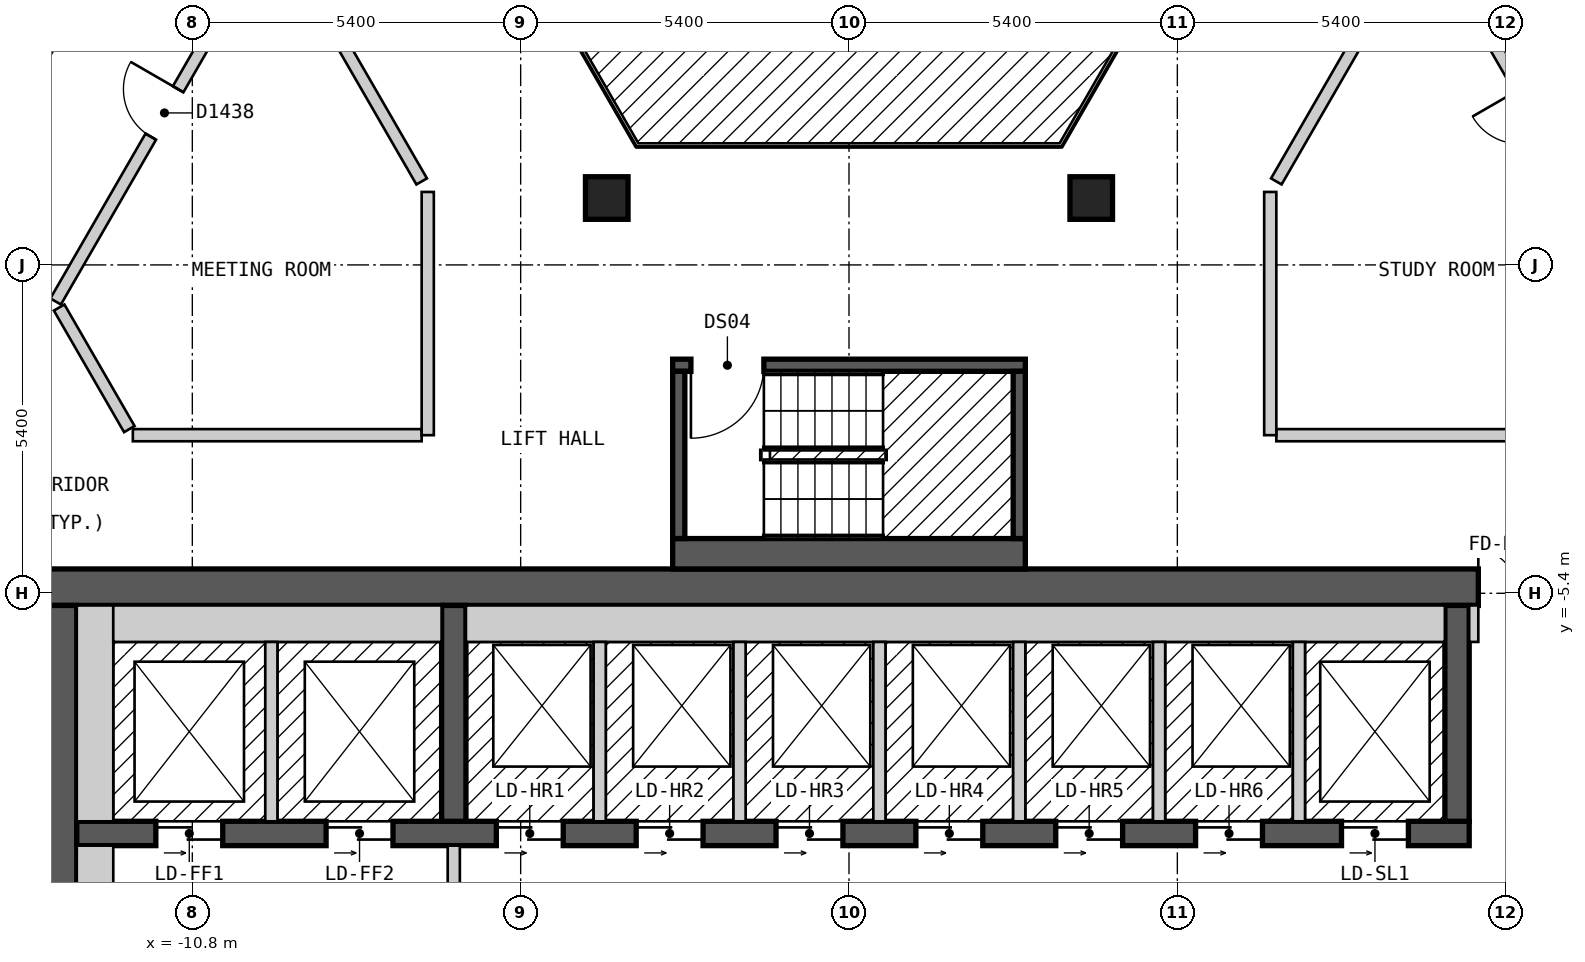
"""IFC4 building model, lengths in metres.
Left out: names, types, materials, properties, quantities, classifications, styles, units other than length and angle.
Written with IfcOpenShell. Run it as: python <this file> out.ifc"""

import sys

from ifc_helpers import new_model, si_unit, direction, frame, frame_2d, origin, origin_2d, place, context, subcontext, project, spatial, rectangle, extrude, element, fill, save


model = new_model("IFC4")
c1 = context("Model", 3, precision=1e-05, world=origin(), true_north=direction((0.0, 1.0)))
c2 = subcontext(c1, "Body", "Model", "MODEL_VIEW")
j1 = project(units=[si_unit("LENGTHUNIT", "METRE"), si_unit("PLANEANGLEUNIT", "RADIAN")], contexts=[c1])
p1 = place(None, origin())
s1 = spatial("IfcSite", under=j1, at=p1, CompositionType="ELEMENT")
p2 = place(p1, origin())
s2 = spatial("IfcBuilding", under=s1, at=p2, CompositionType="ELEMENT")
p3 = place(p2, frame((0.0, 0.0, 172.2)))
s3 = spatial("IfcBuildingStorey", under=s2, at=p3, CompositionType="ELEMENT", Elevation=172.2)
for number, where, z_axis, x_axis in (
    (1, (3.984, 1.1, 0.0), (0.0, 0.0, 1.0), (1.0, 0.0, 0.0)),
    (2, (-3.984, 1.1, 0.0), (0.0, 0.0, 1.0), (1.0, 0.0, 0.0)),
):
    element("IfcColumn", number, at=place(p3, frame(where, z_axis=z_axis, x_axis=x_axis)), inside=s3, PredefinedType="COLUMN", context=c2, shape_type="SweptSolid", body=[
        extrude(rectangle(XDim=0.7, YDim=0.7, at=origin_2d()), origin(), (0.0, 0.0, 1.0), 3.0),
    ])
p4 = place(p3, frame((-13.3, -5.3, 0.0), z_axis=(0.0, 0.0, 1.0), x_axis=(1.0, 0.0, 0.0)))
e3 = element("IfcWall", 3, at=p4, inside=s3, PredefinedType="SHEAR", context=c2, shape_type="SweptSolid", body=[
    extrude(rectangle(XDim=26.6, YDim=0.6, at=frame_2d((13.3, 0.0))), origin(), (0.0, 0.0, 1.0), 2.7),
])
p5 = place(p4, frame((23.65, 0.0, 0.0)))
e4 = element("IfcOpeningElement", 4, at=p5, cuts=e3, PredefinedType="OPENING", context=c2, shape_type="SweptSolid", body=[
    extrude(rectangle(XDim=1.2, YDim=2.1, at=frame_2d((0.6, 1.05))), frame((0.0, 0.31, 0.0), z_axis=(0.0, -1.0, 0.0), x_axis=(1.0, 0.0, 0.0)), (0.0, 0.0, 1.0), 0.62),
])
p6 = place(p3, frame((-13.0, -18.4, 0.0), z_axis=(0.0, 0.0, 1.0), x_axis=(0.0, 1.0, 0.0)))
e5 = element("IfcWall", 5, at=p6, inside=s3, PredefinedType="SHEAR", context=c2, shape_type="SweptSolid", body=[
    extrude(rectangle(XDim=12.8, YDim=0.6, at=frame_2d((6.4, 0.0))), origin(), (0.0, 0.0, 1.0), 2.7),
])
p7 = place(p6, frame((4.2, 0.0, 0.0)))
e6 = element("IfcOpeningElement", 6, at=p7, cuts=e5, PredefinedType="OPENING", context=c2, shape_type="SweptSolid", body=[
    extrude(rectangle(XDim=1.2, YDim=2.1, at=frame_2d((0.6, 1.05))), frame((0.0, 0.31, 0.0), z_axis=(0.0, -1.0, 0.0), x_axis=(1.0, 0.0, 0.0)), (0.0, 0.0, 1.0), 0.62),
])
p8 = place(p3, frame((-12.7, -9.35, 0.0), z_axis=(0.0, 0.0, 1.0), x_axis=(1.0, 0.0, 0.0)))
e7 = element("IfcWall", 7, at=p8, inside=s3, PredefinedType="SHEAR", context=c2, shape_type="SweptSolid", body=[
    extrude(rectangle(XDim=22.9, YDim=0.4, at=frame_2d((11.45, 0.0))), origin(), (0.0, 0.0, 1.0), 2.7),
])
p9 = place(p8, frame((1.3, 0.0, 0.0)))
e8 = element("IfcOpeningElement", 8, at=p9, cuts=e7, PredefinedType="OPENING", context=c2, shape_type="SweptSolid", body=[
    extrude(rectangle(XDim=1.1, YDim=2.1, at=frame_2d((0.55, 1.05))), frame((0.0, 0.21, 0.0), z_axis=(0.0, -1.0, 0.0), x_axis=(1.0, 0.0, 0.0)), (0.0, 0.0, 1.0), 0.42),
])
p10 = place(p8, frame((4.1, 0.0, 0.0)))
e9 = element("IfcOpeningElement", 9, at=p10, cuts=e7, PredefinedType="OPENING", context=c2, shape_type="SweptSolid", body=[
    extrude(rectangle(XDim=1.1, YDim=2.1, at=frame_2d((0.55, 1.05))), frame((0.0, 0.21, 0.0), z_axis=(0.0, -1.0, 0.0), x_axis=(1.0, 0.0, 0.0)), (0.0, 0.0, 1.0), 0.42),
])
p11 = place(p8, frame((6.9, 0.0, 0.0)))
e10 = element("IfcOpeningElement", 10, at=p11, cuts=e7, PredefinedType="OPENING", context=c2, shape_type="SweptSolid", body=[
    extrude(rectangle(XDim=1.1, YDim=2.1, at=frame_2d((0.55, 1.05))), frame((0.0, 0.21, 0.0), z_axis=(0.0, -1.0, 0.0), x_axis=(1.0, 0.0, 0.0)), (0.0, 0.0, 1.0), 0.42),
])
p12 = place(p8, frame((9.2, 0.0, 0.0)))
e11 = element("IfcOpeningElement", 11, at=p12, cuts=e7, PredefinedType="OPENING", context=c2, shape_type="SweptSolid", body=[
    extrude(rectangle(XDim=1.1, YDim=2.1, at=frame_2d((0.55, 1.05))), frame((0.0, 0.21, 0.0), z_axis=(0.0, -1.0, 0.0), x_axis=(1.0, 0.0, 0.0)), (0.0, 0.0, 1.0), 0.42),
])
p13 = place(p8, frame((11.5, 0.0, 0.0)))
e12 = element("IfcOpeningElement", 12, at=p13, cuts=e7, PredefinedType="OPENING", context=c2, shape_type="SweptSolid", body=[
    extrude(rectangle(XDim=1.1, YDim=2.1, at=frame_2d((0.55, 1.05))), frame((0.0, 0.21, 0.0), z_axis=(0.0, -1.0, 0.0), x_axis=(1.0, 0.0, 0.0)), (0.0, 0.0, 1.0), 0.42),
])
p14 = place(p8, frame((13.8, 0.0, 0.0)))
e13 = element("IfcOpeningElement", 13, at=p14, cuts=e7, PredefinedType="OPENING", context=c2, shape_type="SweptSolid", body=[
    extrude(rectangle(XDim=1.1, YDim=2.1, at=frame_2d((0.55, 1.05))), frame((0.0, 0.21, 0.0), z_axis=(0.0, -1.0, 0.0), x_axis=(1.0, 0.0, 0.0)), (0.0, 0.0, 1.0), 0.42),
])
p15 = place(p8, frame((16.1, 0.0, 0.0)))
e14 = element("IfcOpeningElement", 14, at=p15, cuts=e7, PredefinedType="OPENING", context=c2, shape_type="SweptSolid", body=[
    extrude(rectangle(XDim=1.1, YDim=2.1, at=frame_2d((0.55, 1.05))), frame((0.0, 0.21, 0.0), z_axis=(0.0, -1.0, 0.0), x_axis=(1.0, 0.0, 0.0)), (0.0, 0.0, 1.0), 0.42),
])
p16 = place(p8, frame((18.4, 0.0, 0.0)))
e15 = element("IfcOpeningElement", 15, at=p16, cuts=e7, PredefinedType="OPENING", context=c2, shape_type="SweptSolid", body=[
    extrude(rectangle(XDim=1.1, YDim=2.1, at=frame_2d((0.55, 1.05))), frame((0.0, 0.21, 0.0), z_axis=(0.0, -1.0, 0.0), x_axis=(1.0, 0.0, 0.0)), (0.0, 0.0, 1.0), 0.42),
])
p17 = place(p8, frame((20.8, 0.0, 0.0)))
e16 = element("IfcOpeningElement", 16, at=p17, cuts=e7, PredefinedType="OPENING", context=c2, shape_type="SweptSolid", body=[
    extrude(rectangle(XDim=1.1, YDim=2.1, at=frame_2d((0.55, 1.05))), frame((0.0, 0.21, 0.0), z_axis=(0.0, -1.0, 0.0), x_axis=(1.0, 0.0, 0.0)), (0.0, 0.0, 1.0), 0.42),
])
for number, where, z_axis, x_axis in (
    (17, (-6.5, -9.15, 0.0), (0.0, 0.0, 1.0), (0.0, 1.0, 0.0)),
    (18, (10.0, -9.15, 0.0), (0.0, 0.0, 1.0), (0.0, 1.0, 0.0)),
):
    element("IfcWall", number, at=place(p3, frame(where, z_axis=z_axis, x_axis=x_axis)), inside=s3, PredefinedType="SHEAR", context=c2, shape_type="SweptSolid", body=[
        extrude(rectangle(XDim=3.55, YDim=0.4, at=frame_2d((1.775, 0.0))), origin(), (0.0, 0.0, 1.0), 2.7),
    ])
p18 = place(p3, frame((-2.9, -4.75, 0.0), z_axis=(0.0, 0.0, 1.0), x_axis=(1.0, 0.0, 0.0)))
e19 = element("IfcWall", 19, at=p18, inside=s3, PredefinedType="SOLIDWALL", context=c2, shape_type="SweptSolid", body=[
    extrude(rectangle(XDim=5.8, YDim=0.5, at=frame_2d((2.9, 0.0))), origin(), (0.0, 0.0, 1.0), 2.7),
])
p19 = place(p3, frame((-2.9, -1.65, 0.0), z_axis=(0.0, 0.0, 1.0), x_axis=(1.0, 0.0, 0.0)))
e20 = element("IfcWall", 20, at=p19, inside=s3, PredefinedType="SOLIDWALL", context=c2, shape_type="SweptSolid", body=[
    extrude(rectangle(XDim=5.8, YDim=0.2, at=frame_2d((2.9, 0.0))), origin(), (0.0, 0.0, 1.0), 2.7),
])
p20 = place(p19, frame((0.3, 0.0, 0.0)))
e21 = element("IfcOpeningElement", 21, at=p20, cuts=e20, PredefinedType="OPENING", context=c2, shape_type="SweptSolid", body=[
    extrude(rectangle(XDim=1.2, YDim=2.1, at=frame_2d((0.6, 1.05))), frame((0.0, 0.11, 0.0), z_axis=(0.0, -1.0, 0.0), x_axis=(1.0, 0.0, 0.0)), (0.0, 0.0, 1.0), 0.22),
])
for number, where, z_axis, x_axis in (
    (22, (-2.8, -4.5, 0.0), (0.0, 0.0, 1.0), (0.0, 1.0, 0.0)),
    (23, (2.8, -4.5, 0.0), (0.0, 0.0, 1.0), (0.0, 1.0, 0.0)),
):
    element("IfcWall", number, at=place(p3, frame(where, z_axis=z_axis, x_axis=x_axis)), inside=s3, PredefinedType="SOLIDWALL", context=c2, shape_type="SweptSolid", body=[
        extrude(rectangle(XDim=2.75, YDim=0.2, at=frame_2d((1.375, 0.0))), origin(), (0.0, 0.0, 1.0), 2.7),
    ])
p21 = place(p3, frame((-9.411, 5.5, 0.0), z_axis=(0.0, 0.0, 1.0), x_axis=(0.500018099276, -0.86601495391, 0.0)))
e24 = element("IfcWall", 24, at=p21, inside=s3, PredefinedType="PARTITIONING", context=c2, shape_type="SweptSolid", body=[
    extrude(rectangle(XDim=4.765, YDim=0.2, at=frame_2d((2.383, 0.0))), origin(), (0.0, 0.0, 1.0), 2.7),
])
p22 = place(p3, frame((-12.99, -0.701, 0.0), z_axis=(0.0, 0.0, 1.0), x_axis=(0.499972710878, -0.866041158593, 0.0)))
e25 = element("IfcWall", 25, at=p22, inside=s3, PredefinedType="PARTITIONING", context=c2, shape_type="SweptSolid", body=[
    extrude(rectangle(XDim=2.308, YDim=0.2, at=frame_2d((1.154, 0.0))), origin(), (0.0, 0.0, 1.0), 2.7),
])
p23 = place(p3, frame((9.469, 5.6, 0.0), z_axis=(0.0, 0.0, 1.0), x_axis=(0.499964524401, -0.866045884662, 0.0)))
e26 = element("IfcWall", 26, at=p23, inside=s3, PredefinedType="PARTITIONING", context=c2, shape_type="SweptSolid", body=[
    extrude(rectangle(XDim=7.042, YDim=0.2, at=frame_2d((3.521, 0.0))), origin(), (0.0, 0.0, 1.0), 2.7),
])
p24 = place(p23, frame((3.129, 0.0, 0.0)))
e27 = element("IfcOpeningElement", 27, at=p24, cuts=e26, PredefinedType="OPENING", context=c2, shape_type="SweptSolid", body=[
    extrude(rectangle(XDim=0.9, YDim=2.1, at=frame_2d((0.45, 1.05))), frame((0.0, 0.11, 0.0), z_axis=(0.0, -1.0, 0.0), x_axis=(1.0, 0.0, 0.0)), (0.0, 0.0, 1.0), 0.22),
])
p25 = place(p3, frame((10.739, 7.8, 0.0), z_axis=(0.0, 0.0, 1.0), x_axis=(0.499964311759, -0.86604600742, 0.0)))
e28 = element("IfcWall", 28, at=p25, inside=s3, PredefinedType="PARTITIONING", context=c2, shape_type="SweptSolid", body=[
    extrude(rectangle(XDim=9.583, YDim=0.2, at=frame_2d((4.792, 0.0))), origin(), (0.0, 0.0, 1.0), 2.7),
])
p26 = place(p3, frame((-11.778, -2.8, 0.0), z_axis=(0.0, 0.0, 1.0), x_axis=(1.0, 0.0, 0.0)))
e29 = element("IfcWall", 29, at=p26, inside=s3, PredefinedType="PARTITIONING", context=c2, shape_type="SweptSolid", body=[
    extrude(rectangle(XDim=4.75, YDim=0.2, at=frame_2d((2.375, 0.0))), origin(), (0.0, 0.0, 1.0), 2.7),
])
p27 = place(p3, frame((7.028, -2.8, 0.0), z_axis=(0.0, 0.0, 1.0), x_axis=(1.0, 0.0, 0.0)))
e30 = element("IfcWall", 30, at=p27, inside=s3, PredefinedType="PARTITIONING", context=c2, shape_type="SweptSolid", body=[
    extrude(rectangle(XDim=4.634, YDim=0.2, at=frame_2d((2.317, 0.0))), origin(), (0.0, 0.0, 1.0), 2.7),
])
p28 = place(p3, frame((7.028, 1.373, 0.0), z_axis=(0.0, 0.0, 1.0), x_axis=(0.499953126767, 0.866052464367, 0.0)))
e31 = element("IfcWall", 31, at=p28, inside=s3, PredefinedType="PARTITIONING", context=c2, shape_type="SweptSolid", body=[
    extrude(rectangle(XDim=4.764, YDim=0.2, at=frame_2d((2.382, 0.0))), origin(), (0.0, 0.0, 1.0), 2.7),
])
p29 = place(p3, frame((-13.048, -0.601, 0.0), z_axis=(0.0, 0.0, 1.0), x_axis=(0.499982180423, 0.866035691677, 0.0)))
e32 = element("IfcWall", 32, at=p29, inside=s3, PredefinedType="PARTITIONING", context=c2, shape_type="SweptSolid", body=[
    extrude(rectangle(XDim=7.16, YDim=0.2, at=frame_2d((3.58, 0.0))), origin(), (0.0, 0.0, 1.0), 2.7),
])
p30 = place(p29, frame((3.13, 0.0, 0.0)))
e33 = element("IfcOpeningElement", 33, at=p30, cuts=e32, PredefinedType="OPENING", context=c2, shape_type="SweptSolid", body=[
    extrude(rectangle(XDim=0.9, YDim=2.1, at=frame_2d((0.45, 1.05))), frame((0.0, 0.11, 0.0), z_axis=(0.0, -1.0, 0.0), x_axis=(1.0, 0.0, 0.0)), (0.0, 0.0, 1.0), 0.22),
])
p31 = place(p3, frame((-15.53, -0.501, 0.0), z_axis=(0.0, 0.0, 1.0), x_axis=(0.499952498232, 0.866052827206, 0.0)))
e34 = element("IfcWall", 34, at=p31, inside=s3, PredefinedType="PARTITIONING", context=c2, shape_type="SweptSolid", body=[
    extrude(rectangle(XDim=9.585, YDim=0.2, at=frame_2d((4.792, 0.0))), origin(), (0.0, 0.0, 1.0), 2.7),
])
for number, where, z_axis, x_axis in (
    (35, (6.928, -2.8, 0.0), (0.0, 0.0, 1.0), (0.0, 1.0, 0.0)),
    (36, (-6.928, -2.8, 0.0), (0.0, 0.0, 1.0), (0.0, 1.0, 0.0)),
):
    element("IfcWall", number, at=place(p3, frame(where, z_axis=z_axis, x_axis=x_axis)), inside=s3, PredefinedType="PARTITIONING", context=c2, shape_type="SweptSolid", body=[
        extrude(rectangle(XDim=4.0, YDim=0.2, at=frame_2d((2.0, 0.0))), origin(), (0.0, 0.0, 1.0), 2.7),
    ])
p32 = place(p3, frame((-12.4, -13.0, 0.0), z_axis=(0.0, 0.0, 1.0), x_axis=(0.0, 1.0, 0.0)))
e37 = element("IfcWall", 37, at=p32, inside=s3, PredefinedType="PARTITIONING", context=c2, shape_type="SweptSolid", body=[
    extrude(rectangle(XDim=3.45, YDim=0.6, at=frame_2d((1.725, 0.0))), origin(), (0.0, 0.0, 1.0), 2.7),
])
p33 = place(p3, frame((-12.4, -9.15, 0.0), z_axis=(0.0, 0.0, 1.0), x_axis=(0.0, 1.0, 0.0)))
e38 = element("IfcWall", 38, at=p33, inside=s3, PredefinedType="SOLIDWALL", context=c2, shape_type="SweptSolid", body=[
    extrude(rectangle(XDim=3.55, YDim=0.6, at=frame_2d((1.775, 0.0))), origin(), (0.0, 0.0, 1.0), 2.7),
])
p34 = place(p3, frame((-12.1, -5.9, 0.0), z_axis=(0.0, 0.0, 1.0), x_axis=(1.0, 0.0, 0.0)))
e39 = element("IfcWall", 39, at=p34, inside=s3, PredefinedType="SOLIDWALL", context=c2, shape_type="SweptSolid", body=[
    extrude(rectangle(XDim=5.4, YDim=0.6, at=frame_2d((2.7, 0.0))), origin(), (0.0, 0.0, 1.0), 2.7),
])
p35 = place(p3, frame((-9.5, -9.15, 0.0), z_axis=(0.0, 0.0, 1.0), x_axis=(0.0, 1.0, 0.0)))
e40 = element("IfcWall", 40, at=p35, inside=s3, PredefinedType="SOLIDWALL", context=c2, shape_type="SweptSolid", body=[
    extrude(rectangle(XDim=2.95, YDim=0.2, at=frame_2d((1.475, 0.0))), origin(), (0.0, 0.0, 1.0), 2.7),
])
p36 = place(p3, frame((-6.5, -14.45, 0.0), z_axis=(0.0, 0.0, 1.0), x_axis=(0.0, 1.0, 0.0)))
e41 = element("IfcWall", 41, at=p36, inside=s3, PredefinedType="PARTITIONING", context=c2, shape_type="SweptSolid", body=[
    extrude(rectangle(XDim=4.9, YDim=0.2, at=frame_2d((2.45, 0.0))), origin(), (0.0, 0.0, 1.0), 2.7),
])
p37 = place(p36, frame((3.15, 0.0, 0.0), z_axis=(0.0, 0.0, 1.0), x_axis=(-1.0, 0.0, 0.0)))
e42 = element("IfcOpeningElement", 42, at=p37, cuts=e41, PredefinedType="OPENING", context=c2, shape_type="SweptSolid", body=[
    extrude(rectangle(XDim=1.4, YDim=2.1, at=frame_2d((0.7, 1.05))), frame((0.0, 0.11, 0.0), z_axis=(0.0, -1.0, 0.0), x_axis=(1.0, 0.0, 0.0)), (0.0, 0.0, 1.0), 0.22),
])
p38 = place(p3, frame((-6.3, -5.9, 0.0), z_axis=(0.0, 0.0, 1.0), x_axis=(1.0, 0.0, 0.0)))
e43 = element("IfcWall", 43, at=p38, inside=s3, PredefinedType="SOLIDWALL", context=c2, shape_type="SweptSolid", body=[
    extrude(rectangle(XDim=16.1, YDim=0.6, at=frame_2d((8.05, 0.0))), origin(), (0.0, 0.0, 1.0), 2.7),
])
for number, where, z_axis, x_axis in (
    (44, (-4.1, -9.15, 0.0), (0.0, 0.0, 1.0), (0.0, 1.0, 0.0)),
    (45, (-1.8, -9.15, 0.0), (0.0, 0.0, 1.0), (0.0, 1.0, 0.0)),
    (46, (0.5, -9.15, 0.0), (0.0, 0.0, 1.0), (0.0, 1.0, 0.0)),
    (47, (2.8, -9.15, 0.0), (0.0, 0.0, 1.0), (0.0, 1.0, 0.0)),
    (48, (5.1, -9.15, 0.0), (0.0, 0.0, 1.0), (0.0, 1.0, 0.0)),
    (49, (7.4, -9.15, 0.0), (0.0, 0.0, 1.0), (0.0, 1.0, 0.0)),
):
    element("IfcWall", number, at=place(p3, frame(where, z_axis=z_axis, x_axis=x_axis)), inside=s3, PredefinedType="SOLIDWALL", context=c2, shape_type="SweptSolid", body=[
        extrude(rectangle(XDim=2.95, YDim=0.2, at=frame_2d((1.475, 0.0))), origin(), (0.0, 0.0, 1.0), 2.7),
    ])
p39 = place(p3, frame((10.275, -6.2, 0.0), z_axis=(0.0, 0.0, 1.0), x_axis=(0.0, 1.0, 0.0)))
e50 = element("IfcWall", 50, at=p39, inside=s3, PredefinedType="PARTITIONING", context=c2, shape_type="SweptSolid", body=[
    extrude(rectangle(XDim=0.6, YDim=0.15, at=frame_2d((0.3, 0.0))), origin(), (0.0, 0.0, 1.0), 2.7),
])
p40 = place(p20, origin())
e51 = element("IfcDoor", 51, at=p40, inside=s3, OperationType="SINGLE_SWING_LEFT", PredefinedType="DOOR", context=c2, shape_type="SweptSolid", body=[
    extrude(rectangle(XDim=1.2, YDim=2.1, at=frame_2d((0.6, 1.05))), frame((0.0, 0.025, 0.0), z_axis=(0.0, -1.0, 0.0), x_axis=(1.0, 0.0, 0.0)), (0.0, 0.0, 1.0), 0.05),
])
fill(e21, e51)
p41 = place(p30, origin())
e52 = element("IfcDoor", 52, at=p41, inside=s3, OperationType="SINGLE_SWING_RIGHT", PredefinedType="DOOR", context=c2, shape_type="SweptSolid", body=[
    extrude(rectangle(XDim=0.9, YDim=2.1, at=frame_2d((0.45, 1.05))), frame((0.0, 0.025, 0.0), z_axis=(0.0, -1.0, 0.0), x_axis=(1.0, 0.0, 0.0)), (0.0, 0.0, 1.0), 0.05),
])
fill(e33, e52)
p42 = place(p9, origin())
e53 = element("IfcDoor", 53, at=p42, inside=s3, OperationType="DOUBLE_DOOR_SLIDING", PredefinedType="DOOR", context=c2, shape_type="SweptSolid", body=[
    extrude(rectangle(XDim=1.1, YDim=2.1, at=frame_2d((0.55, 1.05))), frame((0.0, 0.025, 0.0), z_axis=(0.0, -1.0, 0.0), x_axis=(1.0, 0.0, 0.0)), (0.0, 0.0, 1.0), 0.05),
])
fill(e8, e53)
p43 = place(p10, origin())
e54 = element("IfcDoor", 54, at=p43, inside=s3, OperationType="DOUBLE_DOOR_SLIDING", PredefinedType="DOOR", context=c2, shape_type="SweptSolid", body=[
    extrude(rectangle(XDim=1.1, YDim=2.1, at=frame_2d((0.55, 1.05))), frame((0.0, 0.025, 0.0), z_axis=(0.0, -1.0, 0.0), x_axis=(1.0, 0.0, 0.0)), (0.0, 0.0, 1.0), 0.05),
])
fill(e9, e54)
p44 = place(p11, origin())
e55 = element("IfcDoor", 55, at=p44, inside=s3, OperationType="DOUBLE_DOOR_SLIDING", PredefinedType="DOOR", context=c2, shape_type="SweptSolid", body=[
    extrude(rectangle(XDim=1.1, YDim=2.1, at=frame_2d((0.55, 1.05))), frame((0.0, 0.025, 0.0), z_axis=(0.0, -1.0, 0.0), x_axis=(1.0, 0.0, 0.0)), (0.0, 0.0, 1.0), 0.05),
])
fill(e10, e55)
p45 = place(p12, origin())
e56 = element("IfcDoor", 56, at=p45, inside=s3, OperationType="DOUBLE_DOOR_SLIDING", PredefinedType="DOOR", context=c2, shape_type="SweptSolid", body=[
    extrude(rectangle(XDim=1.1, YDim=2.1, at=frame_2d((0.55, 1.05))), frame((0.0, 0.025, 0.0), z_axis=(0.0, -1.0, 0.0), x_axis=(1.0, 0.0, 0.0)), (0.0, 0.0, 1.0), 0.05),
])
fill(e11, e56)
p46 = place(p13, origin())
e57 = element("IfcDoor", 57, at=p46, inside=s3, OperationType="DOUBLE_DOOR_SLIDING", PredefinedType="DOOR", context=c2, shape_type="SweptSolid", body=[
    extrude(rectangle(XDim=1.1, YDim=2.1, at=frame_2d((0.55, 1.05))), frame((0.0, 0.025, 0.0), z_axis=(0.0, -1.0, 0.0), x_axis=(1.0, 0.0, 0.0)), (0.0, 0.0, 1.0), 0.05),
])
fill(e12, e57)
p47 = place(p14, origin())
e58 = element("IfcDoor", 58, at=p47, inside=s3, OperationType="DOUBLE_DOOR_SLIDING", PredefinedType="DOOR", context=c2, shape_type="SweptSolid", body=[
    extrude(rectangle(XDim=1.1, YDim=2.1, at=frame_2d((0.55, 1.05))), frame((0.0, 0.025, 0.0), z_axis=(0.0, -1.0, 0.0), x_axis=(1.0, 0.0, 0.0)), (0.0, 0.0, 1.0), 0.05),
])
fill(e13, e58)
p48 = place(p15, origin())
e59 = element("IfcDoor", 59, at=p48, inside=s3, OperationType="DOUBLE_DOOR_SLIDING", PredefinedType="DOOR", context=c2, shape_type="SweptSolid", body=[
    extrude(rectangle(XDim=1.1, YDim=2.1, at=frame_2d((0.55, 1.05))), frame((0.0, 0.025, 0.0), z_axis=(0.0, -1.0, 0.0), x_axis=(1.0, 0.0, 0.0)), (0.0, 0.0, 1.0), 0.05),
])
fill(e14, e59)
p49 = place(p16, origin())
e60 = element("IfcDoor", 60, at=p49, inside=s3, OperationType="DOUBLE_DOOR_SLIDING", PredefinedType="DOOR", context=c2, shape_type="SweptSolid", body=[
    extrude(rectangle(XDim=1.1, YDim=2.1, at=frame_2d((0.55, 1.05))), frame((0.0, 0.025, 0.0), z_axis=(0.0, -1.0, 0.0), x_axis=(1.0, 0.0, 0.0)), (0.0, 0.0, 1.0), 0.05),
])
fill(e15, e60)
p50 = place(p17, origin())
e61 = element("IfcDoor", 61, at=p50, inside=s3, OperationType="DOUBLE_DOOR_SLIDING", PredefinedType="DOOR", context=c2, shape_type="SweptSolid", body=[
    extrude(rectangle(XDim=1.1, YDim=2.1, at=frame_2d((0.55, 1.05))), frame((0.0, 0.025, 0.0), z_axis=(0.0, -1.0, 0.0), x_axis=(1.0, 0.0, 0.0)), (0.0, 0.0, 1.0), 0.05),
])
fill(e16, e61)
p51 = place(p5, origin())
e62 = element("IfcDoor", 62, at=p51, inside=s3, OperationType="DOUBLE_DOOR_SINGLE_SWING", PredefinedType="DOOR", context=c2, shape_type="SweptSolid", body=[
    extrude(rectangle(XDim=1.2, YDim=2.1, at=frame_2d((0.6, 1.05))), frame((0.0, 0.025, 0.0), z_axis=(0.0, -1.0, 0.0), x_axis=(1.0, 0.0, 0.0)), (0.0, 0.0, 1.0), 0.05),
])
fill(e4, e62)
save(model, sys.argv[1])
